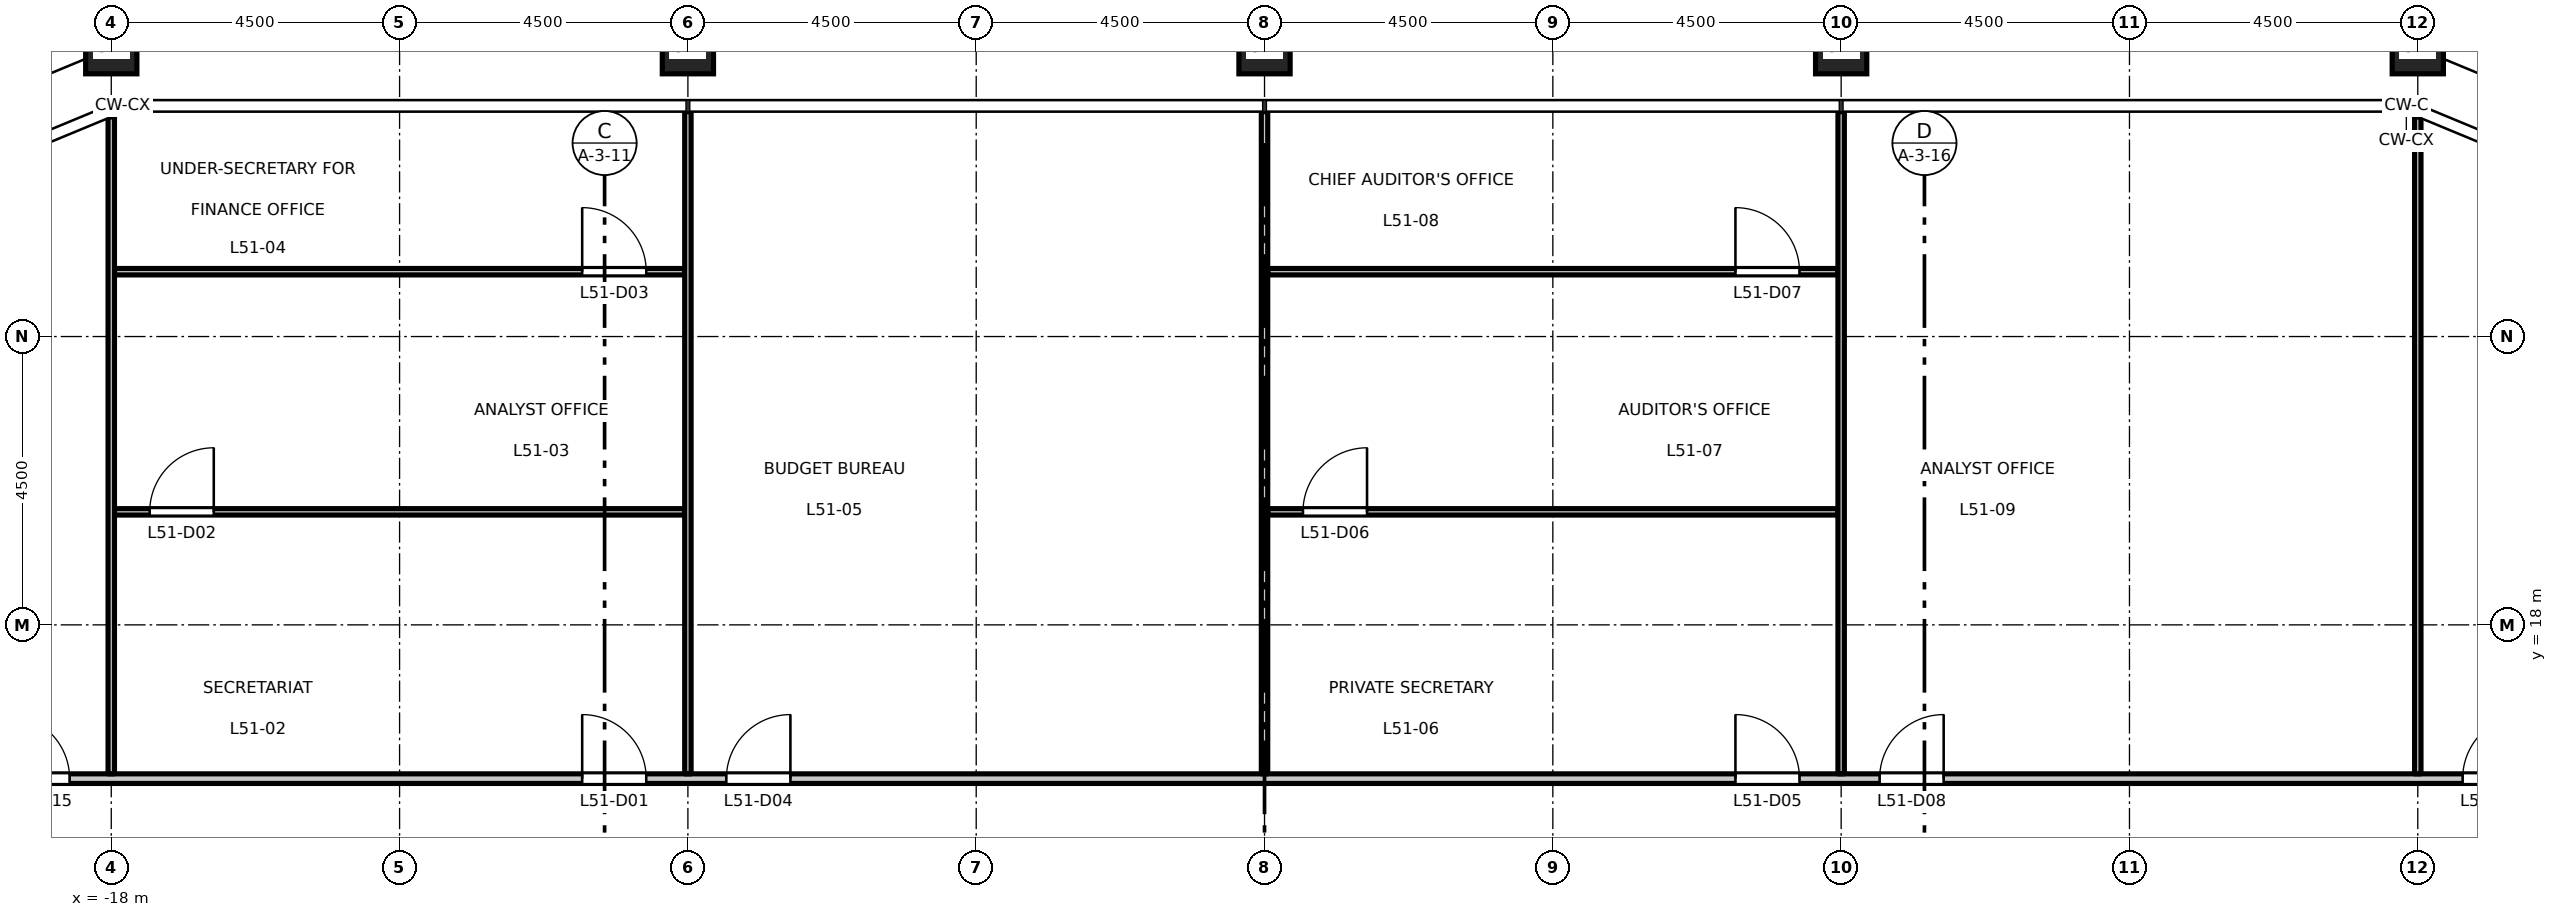
"""IFC4 building model, lengths in metres.
Left out: names, types, materials, properties, quantities, classifications, styles, units other than length and angle.
Written with IfcOpenShell. Run it as: python <this file> out.ifc"""

import sys

from ifc_helpers import new_model, si_unit, direction, frame, frame_2d, origin, origin_2d, place, context, subcontext, project, spatial, rectangle, hollow_rectangle, extrude, element, fill, save


model = new_model("IFC4")
c1 = context("Model", 3, precision=1e-05, world=origin(), true_north=direction((0.0, 1.0)))
c2 = subcontext(c1, "Body", "Model", "MODEL_VIEW")
j1 = project(units=[si_unit("LENGTHUNIT", "METRE"), si_unit("PLANEANGLEUNIT", "RADIAN")], contexts=[c1])
p1 = place(None, origin())
s1 = spatial("IfcSite", under=j1, at=p1, CompositionType="ELEMENT")
p2 = place(p1, origin())
s2 = spatial("IfcBuilding", under=s1, at=p2, CompositionType="ELEMENT")
p3 = place(p2, frame((0.0, 0.0, 237.7)))
s3 = spatial("IfcBuildingStorey", under=s2, at=p3, CompositionType="ELEMENT", Elevation=237.7)
for number, where, z_axis, x_axis in (
    (1, (18.0, 27.0, 0.0), (0.0, 0.0, 1.0), (1.0, 0.0, 0.0)),
    (2, (9.0, 27.0, 0.0), (0.0, 0.0, 1.0), (1.0, 0.0, 0.0)),
    (3, (0.0, 27.0, 0.0), (0.0, 0.0, 1.0), (1.0, 0.0, 0.0)),
    (4, (-9.0, 27.0, 0.0), (0.0, 0.0, 1.0), (1.0, 0.0, 0.0)),
    (5, (-18.0, 27.0, 0.0), (0.0, 0.0, 1.0), (1.0, 0.0, 0.0)),
):
    element("IfcColumn", number, at=place(p3, frame(where, z_axis=z_axis, x_axis=x_axis)), inside=s3, PredefinedType="COLUMN", context=c2, shape_type="SweptSolid", body=[
        extrude(hollow_rectangle(XDim=0.8, YDim=0.8, WallThickness=0.045, at=origin_2d()), origin(), (0.0, 0.0, 1.0), 4.5),
    ])
p4 = place(p3, frame((-23.925, 15.6, 0.0), z_axis=(0.0, 0.0, 1.0), x_axis=(1.0, 0.0, 0.0)))
e6 = element("IfcWall", 6, at=p4, inside=s3, PredefinedType="PARTITIONING", context=c2, shape_type="SweptSolid", body=[
    extrude(rectangle(XDim=47.85, YDim=0.15, at=frame_2d((23.925, 0.0))), origin(), (0.0, 0.0, 1.0), 4.35),
])
p5 = place(p4, frame((13.275, 0.0, 0.0)))
e7 = element("IfcOpeningElement", 7, at=p5, cuts=e6, PredefinedType="OPENING", context=c2, shape_type="SweptSolid", body=[
    extrude(rectangle(XDim=1.0, YDim=2.1, at=frame_2d((0.5, 1.05))), frame((0.0, 0.085, 0.0), z_axis=(0.0, -1.0, 0.0), x_axis=(1.0, 0.0, 0.0)), (0.0, 0.0, 1.0), 0.17),
])
p6 = place(p4, frame((15.525, 0.0, 0.0)))
e8 = element("IfcOpeningElement", 8, at=p6, cuts=e6, PredefinedType="OPENING", context=c2, shape_type="SweptSolid", body=[
    extrude(rectangle(XDim=1.0, YDim=2.1, at=frame_2d((0.5, 1.05))), frame((0.0, 0.085, 0.0), z_axis=(0.0, -1.0, 0.0), x_axis=(1.0, 0.0, 0.0)), (0.0, 0.0, 1.0), 0.17),
])
p7 = place(p4, frame((31.275, 0.0, 0.0)))
e9 = element("IfcOpeningElement", 9, at=p7, cuts=e6, PredefinedType="OPENING", context=c2, shape_type="SweptSolid", body=[
    extrude(rectangle(XDim=1.0, YDim=2.1, at=frame_2d((0.5, 1.05))), frame((0.0, 0.085, 0.0), z_axis=(0.0, -1.0, 0.0), x_axis=(1.0, 0.0, 0.0)), (0.0, 0.0, 1.0), 0.17),
])
p8 = place(p4, frame((33.525, 0.0, 0.0)))
e10 = element("IfcOpeningElement", 10, at=p8, cuts=e6, PredefinedType="OPENING", context=c2, shape_type="SweptSolid", body=[
    extrude(rectangle(XDim=1.0, YDim=2.1, at=frame_2d((0.5, 1.05))), frame((0.0, 0.085, 0.0), z_axis=(0.0, -1.0, 0.0), x_axis=(1.0, 0.0, 0.0)), (0.0, 0.0, 1.0), 0.17),
])
p9 = place(p4, frame((4.275, 0.0, 0.0)))
e11 = element("IfcOpeningElement", 11, at=p9, cuts=e6, PredefinedType="OPENING", context=c2, shape_type="SweptSolid", body=[
    extrude(rectangle(XDim=1.0, YDim=2.1, at=frame_2d((0.5, 1.05))), frame((0.0, 0.085, 0.0), z_axis=(0.0, -1.0, 0.0), x_axis=(1.0, 0.0, 0.0)), (0.0, 0.0, 1.0), 0.17),
])
p10 = place(p4, frame((42.625, 0.0, 0.0)))
e12 = element("IfcOpeningElement", 12, at=p10, cuts=e6, PredefinedType="OPENING", context=c2, shape_type="SweptSolid", body=[
    extrude(rectangle(XDim=1.0, YDim=2.1, at=frame_2d((0.5, 1.05))), frame((0.0, 0.085, 0.0), z_axis=(0.0, -1.0, 0.0), x_axis=(1.0, 0.0, 0.0)), (0.0, 0.0, 1.0), 0.17),
])
p11 = place(p3, frame((-17.95, 19.764, 0.0), z_axis=(0.0, 0.0, 1.0), x_axis=(1.0, 0.0, 0.0)))
e13 = element("IfcWall", 13, at=p11, inside=s3, PredefinedType="PARTITIONING", context=c2, shape_type="SweptSolid", body=[
    extrude(rectangle(XDim=8.9, YDim=0.1, at=frame_2d((4.45, 0.0))), origin(), (0.0, 0.0, 1.0), 4.35),
])
p12 = place(p11, frame((0.55, 0.0, 0.0)))
e14 = element("IfcOpeningElement", 14, at=p12, cuts=e13, PredefinedType="OPENING", context=c2, shape_type="SweptSolid", body=[
    extrude(rectangle(XDim=1.0, YDim=2.1, at=frame_2d((0.5, 1.05))), frame((0.0, 0.06, 0.0), z_axis=(0.0, -1.0, 0.0), x_axis=(1.0, 0.0, 0.0)), (0.0, 0.0, 1.0), 0.12),
])
p13 = place(p3, frame((0.05, 19.764, 0.0), z_axis=(0.0, 0.0, 1.0), x_axis=(1.0, 0.0, 0.0)))
e15 = element("IfcWall", 15, at=p13, inside=s3, PredefinedType="PARTITIONING", context=c2, shape_type="SweptSolid", body=[
    extrude(rectangle(XDim=8.9, YDim=0.1, at=frame_2d((4.45, 0.0))), origin(), (0.0, 0.0, 1.0), 4.35),
])
p14 = place(p13, frame((0.55, 0.0, 0.0)))
e16 = element("IfcOpeningElement", 16, at=p14, cuts=e15, PredefinedType="OPENING", context=c2, shape_type="SweptSolid", body=[
    extrude(rectangle(XDim=1.0, YDim=2.1, at=frame_2d((0.5, 1.05))), frame((0.0, 0.06, 0.0), z_axis=(0.0, -1.0, 0.0), x_axis=(1.0, 0.0, 0.0)), (0.0, 0.0, 1.0), 0.12),
])
p15 = place(p3, frame((-17.95, 23.512, 0.0), z_axis=(0.0, 0.0, 1.0), x_axis=(1.0, 0.0, 0.0)))
e17 = element("IfcWall", 17, at=p15, inside=s3, PredefinedType="PARTITIONING", context=c2, shape_type="SweptSolid", body=[
    extrude(rectangle(XDim=8.9, YDim=0.1, at=frame_2d((4.45, 0.0))), origin(), (0.0, 0.0, 1.0), 4.35),
])
p16 = place(p15, frame((7.3, 0.0, 0.0)))
e18 = element("IfcOpeningElement", 18, at=p16, cuts=e17, PredefinedType="OPENING", context=c2, shape_type="SweptSolid", body=[
    extrude(rectangle(XDim=1.0, YDim=2.1, at=frame_2d((0.5, 1.05))), frame((0.0, 0.06, 0.0), z_axis=(0.0, -1.0, 0.0), x_axis=(1.0, 0.0, 0.0)), (0.0, 0.0, 1.0), 0.12),
])
p17 = place(p3, frame((0.05, 23.512, 0.0), z_axis=(0.0, 0.0, 1.0), x_axis=(1.0, 0.0, 0.0)))
e19 = element("IfcWall", 19, at=p17, inside=s3, PredefinedType="PARTITIONING", context=c2, shape_type="SweptSolid", body=[
    extrude(rectangle(XDim=8.9, YDim=0.1, at=frame_2d((4.45, 0.0))), origin(), (0.0, 0.0, 1.0), 4.35),
])
p18 = place(p17, frame((7.3, 0.0, 0.0)))
e20 = element("IfcOpeningElement", 20, at=p18, cuts=e19, PredefinedType="OPENING", context=c2, shape_type="SweptSolid", body=[
    extrude(rectangle(XDim=1.0, YDim=2.1, at=frame_2d((0.5, 1.05))), frame((0.0, 0.06, 0.0), z_axis=(0.0, -1.0, 0.0), x_axis=(1.0, 0.0, 0.0)), (0.0, 0.0, 1.0), 0.12),
])
p19 = place(p3, frame((-18.0, 15.675, 0.0), z_axis=(0.0, 0.0, 1.0), x_axis=(0.0, 1.0, 0.0)))
e21 = element("IfcWall", 21, at=p19, inside=s3, PredefinedType="PARTITIONING", context=c2, shape_type="SweptSolid", body=[
    extrude(rectangle(XDim=10.253, YDim=0.1, at=frame_2d((5.126, 0.0))), origin(), (0.0, 0.0, 1.0), 3.65),
])
p20 = place(p3, frame((-9.0, 15.675, 0.0), z_axis=(0.0, 0.0, 1.0), x_axis=(0.0, 1.0, 0.0)))
e22 = element("IfcWall", 22, at=p20, inside=s3, PredefinedType="PARTITIONING", context=c2, shape_type="SweptSolid", body=[
    extrude(rectangle(XDim=10.335, YDim=0.1, at=frame_2d((5.167, 0.0))), origin(), (0.0, 0.0, 1.0), 3.65),
])
p21 = place(p3, frame((0.0, 15.675, 0.0), z_axis=(0.0, 0.0, 1.0), x_axis=(0.0, 1.0, 0.0)))
e23 = element("IfcWall", 23, at=p21, inside=s3, PredefinedType="PARTITIONING", context=c2, shape_type="SweptSolid", body=[
    extrude(rectangle(XDim=10.335, YDim=0.1, at=frame_2d((5.167, 0.0))), origin(), (0.0, 0.0, 1.0), 3.55),
])
p22 = place(p3, frame((9.0, 15.675, 0.0), z_axis=(0.0, 0.0, 1.0), x_axis=(0.0, 1.0, 0.0)))
e24 = element("IfcWall", 24, at=p22, inside=s3, PredefinedType="PARTITIONING", context=c2, shape_type="SweptSolid", body=[
    extrude(rectangle(XDim=10.335, YDim=0.1, at=frame_2d((5.167, 0.0))), origin(), (0.0, 0.0, 1.0), 3.65),
])
p23 = place(p3, frame((18.0, 15.675, 0.0), z_axis=(0.0, 0.0, 1.0), x_axis=(0.0, 1.0, 0.0)))
e25 = element("IfcWall", 25, at=p23, inside=s3, PredefinedType="PARTITIONING", context=c2, shape_type="SweptSolid", body=[
    extrude(rectangle(XDim=10.253, YDim=0.1, at=frame_2d((5.126, 0.0))), origin(), (0.0, 0.0, 1.0), 3.65),
])
p24 = place(p5, origin())
e26 = element("IfcDoor", 26, at=p24, inside=s3, OperationType="SINGLE_SWING_LEFT", PredefinedType="DOOR", context=c2, shape_type="SweptSolid", body=[
    extrude(rectangle(XDim=1.0, YDim=2.1, at=frame_2d((0.5, 1.05))), frame((0.0, 0.025, 0.0), z_axis=(0.0, -1.0, 0.0), x_axis=(1.0, 0.0, 0.0)), (0.0, 0.0, 1.0), 0.05),
])
fill(e7, e26)
p25 = place(p12, origin())
e27 = element("IfcDoor", 27, at=p25, inside=s3, OperationType="SINGLE_SWING_RIGHT", PredefinedType="DOOR", context=c2, shape_type="SweptSolid", body=[
    extrude(rectangle(XDim=1.0, YDim=2.1, at=frame_2d((0.5, 1.05))), frame((0.0, 0.025, 0.0), z_axis=(0.0, -1.0, 0.0), x_axis=(1.0, 0.0, 0.0)), (0.0, 0.0, 1.0), 0.05),
])
fill(e14, e27)
p26 = place(p16, origin())
e28 = element("IfcDoor", 28, at=p26, inside=s3, OperationType="SINGLE_SWING_LEFT", PredefinedType="DOOR", context=c2, shape_type="SweptSolid", body=[
    extrude(rectangle(XDim=1.0, YDim=2.1, at=frame_2d((0.5, 1.05))), frame((0.0, 0.025, 0.0), z_axis=(0.0, -1.0, 0.0), x_axis=(1.0, 0.0, 0.0)), (0.0, 0.0, 1.0), 0.05),
])
fill(e18, e28)
p27 = place(p6, origin())
e29 = element("IfcDoor", 29, at=p27, inside=s3, OperationType="SINGLE_SWING_RIGHT", PredefinedType="DOOR", context=c2, shape_type="SweptSolid", body=[
    extrude(rectangle(XDim=1.0, YDim=2.1, at=frame_2d((0.5, 1.05))), frame((0.0, 0.025, 0.0), z_axis=(0.0, -1.0, 0.0), x_axis=(1.0, 0.0, 0.0)), (0.0, 0.0, 1.0), 0.05),
])
fill(e8, e29)
p28 = place(p7, origin())
e30 = element("IfcDoor", 30, at=p28, inside=s3, OperationType="SINGLE_SWING_LEFT", PredefinedType="DOOR", context=c2, shape_type="SweptSolid", body=[
    extrude(rectangle(XDim=1.0, YDim=2.1, at=frame_2d((0.5, 1.05))), frame((0.0, 0.025, 0.0), z_axis=(0.0, -1.0, 0.0), x_axis=(1.0, 0.0, 0.0)), (0.0, 0.0, 1.0), 0.05),
])
fill(e9, e30)
p29 = place(p14, origin())
e31 = element("IfcDoor", 31, at=p29, inside=s3, OperationType="SINGLE_SWING_RIGHT", PredefinedType="DOOR", context=c2, shape_type="SweptSolid", body=[
    extrude(rectangle(XDim=1.0, YDim=2.1, at=frame_2d((0.5, 1.05))), frame((0.0, 0.025, 0.0), z_axis=(0.0, -1.0, 0.0), x_axis=(1.0, 0.0, 0.0)), (0.0, 0.0, 1.0), 0.05),
])
fill(e16, e31)
p30 = place(p18, origin())
e32 = element("IfcDoor", 32, at=p30, inside=s3, OperationType="SINGLE_SWING_LEFT", PredefinedType="DOOR", context=c2, shape_type="SweptSolid", body=[
    extrude(rectangle(XDim=1.0, YDim=2.1, at=frame_2d((0.5, 1.05))), frame((0.0, 0.025, 0.0), z_axis=(0.0, -1.0, 0.0), x_axis=(1.0, 0.0, 0.0)), (0.0, 0.0, 1.0), 0.05),
])
fill(e20, e32)
p31 = place(p8, origin())
e33 = element("IfcDoor", 33, at=p31, inside=s3, OperationType="SINGLE_SWING_RIGHT", PredefinedType="DOOR", context=c2, shape_type="SweptSolid", body=[
    extrude(rectangle(XDim=1.0, YDim=2.1, at=frame_2d((0.5, 1.05))), frame((0.0, 0.025, 0.0), z_axis=(0.0, -1.0, 0.0), x_axis=(1.0, 0.0, 0.0)), (0.0, 0.0, 1.0), 0.05),
])
fill(e10, e33)
p32 = place(p9, origin())
e34 = element("IfcDoor", 34, at=p32, inside=s3, OperationType="SINGLE_SWING_LEFT", PredefinedType="DOOR", context=c2, shape_type="SweptSolid", body=[
    extrude(rectangle(XDim=1.0, YDim=2.1, at=frame_2d((0.5, 1.05))), frame((0.0, 0.025, 0.0), z_axis=(0.0, -1.0, 0.0), x_axis=(1.0, 0.0, 0.0)), (0.0, 0.0, 1.0), 0.05),
])
fill(e11, e34)
p33 = place(p10, origin())
e35 = element("IfcDoor", 35, at=p33, inside=s3, OperationType="SINGLE_SWING_RIGHT", PredefinedType="DOOR", context=c2, shape_type="SweptSolid", body=[
    extrude(rectangle(XDim=1.0, YDim=2.1, at=frame_2d((0.5, 1.05))), frame((0.0, 0.025, 0.0), z_axis=(0.0, -1.0, 0.0), x_axis=(1.0, 0.0, 0.0)), (0.0, 0.0, 1.0), 0.05),
])
fill(e12, e35)
save(model, sys.argv[1])
